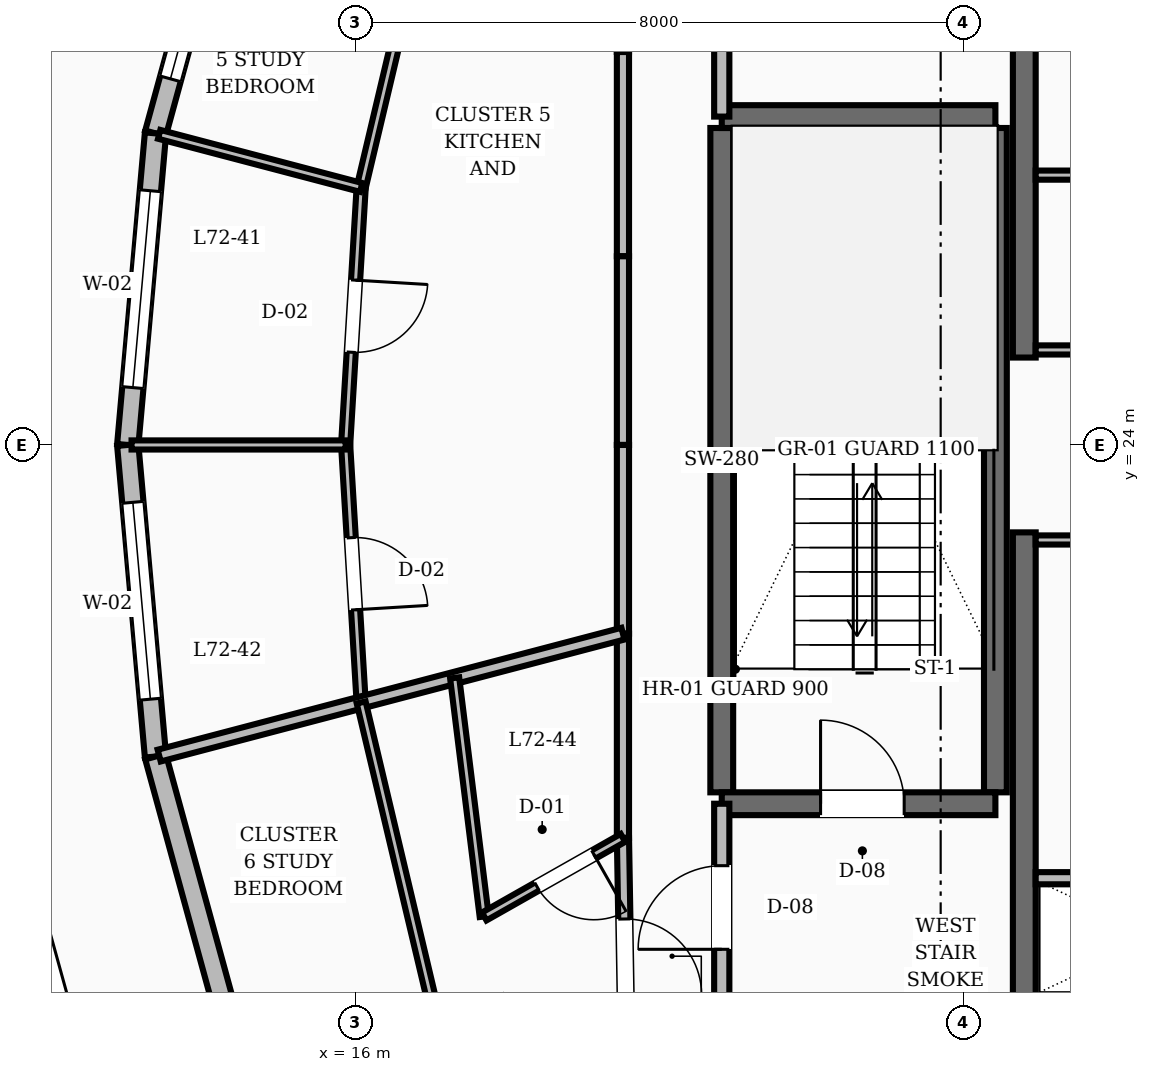
"""IFC4 building model, lengths in metres.
Left out: names, types, materials, properties, quantities, classifications, styles, units other than length and angle.
Written with IfcOpenShell. Run it as: python <this file> out.ifc"""

import sys

from ifc_helpers import new_model, si_unit, direction, frame, frame_2d, origin, place, context, subcontext, project, spatial, rectangle, extrude, element, fill, save


model = new_model("IFC4")
c1 = context("Model", 3, precision=1e-05, world=origin(), true_north=direction((0.0, 1.0)))
c2 = subcontext(c1, "Body", "Model", "MODEL_VIEW")
j1 = project(units=[si_unit("LENGTHUNIT", "METRE"), si_unit("PLANEANGLEUNIT", "RADIAN")], contexts=[c1])
p1 = place(None, origin())
s1 = spatial("IfcSite", under=j1, at=p1, CompositionType="ELEMENT")
p2 = place(p1, origin())
s2 = spatial("IfcBuilding", under=s1, at=p2, CompositionType="ELEMENT")
p3 = place(p2, frame((0.0, 0.0, 276.0)))
s3 = spatial("IfcBuildingStorey", under=s2, at=p3, CompositionType="ELEMENT", Elevation=276.0)
for number, where, z_axis, x_axis in (
    (1, (24.8, 16.55, 0.0), (0.0, 0.0, 1.0), (0.0, 1.0, 0.0)),
    (2, (24.8, 25.15, 0.0), (0.0, 0.0, 1.0), (0.0, 1.0, 0.0)),
):
    element("IfcWall", number, at=place(p3, frame(where, z_axis=z_axis, x_axis=x_axis)), inside=s3, PredefinedType="SHEAR", context=c2, shape_type="SweptSolid", body=[
        extrude(rectangle(XDim=6.3, YDim=0.3, at=frame_2d((3.15, 0.0))), origin(), (0.0, 0.0, 1.0), 3.6),
    ])
for number, where, z_axis, x_axis in (
    (3, (20.82, 19.43, 0.0), (0.0, 0.0, 1.0), (0.0, 1.0, 0.0)),
    (4, (24.42, 19.43, 0.0), (0.0, 0.0, 1.0), (0.0, 1.0, 0.0)),
):
    element("IfcWall", number, at=place(p3, frame(where, z_axis=z_axis, x_axis=x_axis)), inside=s3, PredefinedType="SHEAR", context=c2, shape_type="SweptSolid", body=[
        extrude(rectangle(XDim=8.74, YDim=0.3, at=frame_2d((4.37, 0.0))), origin(), (0.0, 0.0, 1.0), 3.6),
    ])
p4 = place(p3, frame((20.82, 19.28, 0.0), z_axis=(0.0, 0.0, 1.0), x_axis=(1.0, 0.0, 0.0)))
e5 = element("IfcWall", 5, at=p4, inside=s3, PredefinedType="SHEAR", context=c2, shape_type="SweptSolid", body=[
    extrude(rectangle(XDim=3.6, YDim=0.3, at=frame_2d((1.8, 0.0))), origin(), (0.0, 0.0, 1.0), 3.6),
])
p5 = place(p4, frame((1.3, 0.0, 0.0)))
e6 = element("IfcOpeningElement", 6, at=p5, cuts=e5, PredefinedType="OPENING", context=c2, shape_type="SweptSolid", body=[
    extrude(rectangle(XDim=1.1, YDim=2.1, at=frame_2d((0.55, 1.05))), frame((0.0, 0.16, 0.0), z_axis=(0.0, -1.0, 0.0), x_axis=(1.0, 0.0, 0.0)), (0.0, 0.0, 1.0), 0.32),
])
p6 = place(p3, frame((20.82, 28.32, 0.0), z_axis=(0.0, 0.0, 1.0), x_axis=(1.0, 0.0, 0.0)))
e7 = element("IfcWall", 7, at=p6, inside=s3, PredefinedType="SHEAR", context=c2, shape_type="SweptSolid", body=[
    extrude(rectangle(XDim=3.6, YDim=0.3, at=frame_2d((1.8, 0.0))), origin(), (0.0, 0.0, 1.0), 3.6),
])
p7 = place(p3, frame((14.451, 32.041, 0.0), z_axis=(0.0, 0.0, 1.0), x_axis=(-0.264426176781, -0.964405929592, 0.0)))
e8 = element("IfcWall", 8, at=p7, inside=s3, PredefinedType="STANDARD", context=c2, shape_type="SweptSolid", body=[
    extrude(rectangle(XDim=4.087, YDim=0.28, at=frame_2d((2.044, 0.0))), origin(), (0.0, 0.0, 1.0), 2.88),
])
p8 = place(p7, frame((0.744, 0.0, 0.8)))
e9 = element("IfcOpeningElement", 9, at=p8, cuts=e8, PredefinedType="OPENING", context=c2, shape_type="SweptSolid", body=[
    extrude(rectangle(XDim=2.6, YDim=1.65, at=frame_2d((1.3, 0.825))), frame((0.0, 0.15, 0.0), z_axis=(0.0, -1.0, 0.0), x_axis=(1.0, 0.0, 0.0)), (0.0, 0.0, 1.0), 0.3),
])
p9 = place(p3, frame((13.37, 28.099, 0.0), z_axis=(0.0, 0.0, 1.0), x_axis=(-0.08868496751, -0.996059725387, 0.0)))
e10 = element("IfcWall", 10, at=p9, inside=s3, PredefinedType="STANDARD", context=c2, shape_type="SweptSolid", body=[
    extrude(rectangle(XDim=4.115, YDim=0.28, at=frame_2d((2.058, 0.0))), origin(), (0.0, 0.0, 1.0), 2.88),
])
p10 = place(p9, frame((0.758, 0.0, 0.8)))
e11 = element("IfcOpeningElement", 11, at=p10, cuts=e10, PredefinedType="OPENING", context=c2, shape_type="SweptSolid", body=[
    extrude(rectangle(XDim=2.6, YDim=1.65, at=frame_2d((1.3, 0.825))), frame((0.0, 0.15, 0.0), z_axis=(0.0, -1.0, 0.0), x_axis=(1.0, 0.0, 0.0)), (0.0, 0.0, 1.0), 0.3),
])
p11 = place(p3, frame((13.005, 24.0, 0.0), z_axis=(0.0, 0.0, 1.0), x_axis=(0.08868496751, -0.996059725387, 0.0)))
e12 = element("IfcWall", 12, at=p11, inside=s3, PredefinedType="STANDARD", context=c2, shape_type="SweptSolid", body=[
    extrude(rectangle(XDim=4.115, YDim=0.28, at=frame_2d((2.058, 0.0))), origin(), (0.0, 0.0, 1.0), 2.88),
])
p12 = place(p11, frame((0.758, 0.0, 0.8)))
e13 = element("IfcOpeningElement", 13, at=p12, cuts=e12, PredefinedType="OPENING", context=c2, shape_type="SweptSolid", body=[
    extrude(rectangle(XDim=2.6, YDim=1.65, at=frame_2d((1.3, 0.825))), frame((0.0, 0.15, 0.0), z_axis=(0.0, -1.0, 0.0), x_axis=(1.0, 0.0, 0.0)), (0.0, 0.0, 1.0), 0.3),
])
p13 = place(p3, frame((13.37, 19.901, 0.0), z_axis=(0.0, 0.0, 1.0), x_axis=(0.264426176781, -0.964405929592, 0.0)))
e14 = element("IfcWall", 14, at=p13, inside=s3, PredefinedType="STANDARD", context=c2, shape_type="SweptSolid", body=[
    extrude(rectangle(XDim=4.087, YDim=0.28, at=frame_2d((2.044, 0.0))), origin(), (0.0, 0.0, 1.0), 2.88),
])
p14 = place(p3, frame((20.82, 16.55, 0.0), z_axis=(0.0, 0.0, 1.0), x_axis=(0.0, 1.0, 0.0)))
e15 = element("IfcWall", 15, at=p14, inside=s3, PredefinedType="SOLIDWALL", context=c2, shape_type="SweptSolid", body=[
    extrude(rectangle(XDim=2.73, YDim=0.2, at=frame_2d((1.365, 0.0))), origin(), (0.0, 0.0, 1.0), 2.87),
])
p15 = place(p14, frame((0.815, 0.0, 0.0)))
e16 = element("IfcOpeningElement", 16, at=p15, cuts=e15, PredefinedType="OPENING", context=c2, shape_type="SweptSolid", body=[
    extrude(rectangle(XDim=1.1, YDim=2.1, at=frame_2d((0.55, 1.05))), frame((0.0, 0.11, 0.0), z_axis=(0.0, -1.0, 0.0), x_axis=(1.0, 0.0, 0.0)), (0.0, 0.0, 1.0), 0.22),
])
p16 = place(p3, frame((20.82, 28.32, 0.0), z_axis=(0.0, 0.0, 1.0), x_axis=(0.0, 1.0, 0.0)))
e17 = element("IfcWall", 17, at=p16, inside=s3, PredefinedType="SOLIDWALL", context=c2, shape_type="SweptSolid", body=[
    extrude(rectangle(XDim=3.13, YDim=0.2, at=frame_2d((1.565, 0.0))), origin(), (0.0, 0.0, 1.0), 2.87),
])
p17 = place(p16, frame((1.09, 0.0, 0.0)))
e18 = element("IfcOpeningElement", 18, at=p17, cuts=e17, PredefinedType="OPENING", context=c2, shape_type="SweptSolid", body=[
    extrude(rectangle(XDim=0.95, YDim=2.1, at=frame_2d((0.475, 1.05))), frame((0.0, 0.11, 0.0), z_axis=(0.0, -1.0, 0.0), x_axis=(1.0, 0.0, 0.0)), (0.0, 0.0, 1.0), 0.22),
])
p18 = place(p3, frame((24.95, 18.3, 0.0), z_axis=(0.0, 0.0, 1.0), x_axis=(1.0, 0.0, 0.0)))
e19 = element("IfcWall", 19, at=p18, inside=s3, PredefinedType="SOLIDWALL", context=c2, shape_type="SweptSolid", body=[
    extrude(rectangle(XDim=3.2, YDim=0.16, at=frame_2d((1.6, 0.0))), origin(), (0.0, 0.0, 1.0), 2.87),
])
p19 = place(p3, frame((24.95, 25.25, 0.0), z_axis=(0.0, 0.0, 1.0), x_axis=(1.0, 0.0, 0.0)))
e20 = element("IfcWall", 20, at=p19, inside=s3, PredefinedType="PARTITIONING", context=c2, shape_type="SweptSolid", body=[
    extrude(rectangle(XDim=3.2, YDim=0.12, at=frame_2d((1.6, 0.0))), origin(), (0.0, 0.0, 1.0), 2.87),
])
p20 = place(p19, frame((1.125, 0.0, 0.0)))
e21 = element("IfcOpeningElement", 21, at=p20, cuts=e20, PredefinedType="OPENING", context=c2, shape_type="SweptSolid", body=[
    extrude(rectangle(XDim=0.95, YDim=2.1, at=frame_2d((0.475, 1.05))), frame((0.0, 0.07, 0.0), z_axis=(0.0, -1.0, 0.0), x_axis=(1.0, 0.0, 0.0)), (0.0, 0.0, 1.0), 0.14),
])
p21 = place(p3, frame((24.95, 22.75, 0.0), z_axis=(0.0, 0.0, 1.0), x_axis=(1.0, 0.0, 0.0)))
e22 = element("IfcWall", 22, at=p21, inside=s3, PredefinedType="PARTITIONING", context=c2, shape_type="SweptSolid", body=[
    extrude(rectangle(XDim=3.2, YDim=0.12, at=frame_2d((1.6, 0.0))), origin(), (0.0, 0.0, 1.0), 2.87),
])
p22 = place(p21, frame((1.125, 0.0, 0.0)))
e23 = element("IfcOpeningElement", 23, at=p22, cuts=e22, PredefinedType="OPENING", context=c2, shape_type="SweptSolid", body=[
    extrude(rectangle(XDim=0.95, YDim=2.1, at=frame_2d((0.475, 1.05))), frame((0.0, 0.07, 0.0), z_axis=(0.0, -1.0, 0.0), x_axis=(1.0, 0.0, 0.0)), (0.0, 0.0, 1.0), 0.14),
])
p23 = place(p3, frame((24.95, 27.55, 0.0), z_axis=(0.0, 0.0, 1.0), x_axis=(1.0, 0.0, 0.0)))
e24 = element("IfcWall", 24, at=p23, inside=s3, PredefinedType="PARTITIONING", context=c2, shape_type="SweptSolid", body=[
    extrude(rectangle(XDim=3.2, YDim=0.12, at=frame_2d((1.6, 0.0))), origin(), (0.0, 0.0, 1.0), 2.87),
])
p24 = place(p23, frame((1.125, 0.0, 0.0)))
e25 = element("IfcOpeningElement", 25, at=p24, cuts=e24, PredefinedType="OPENING", context=c2, shape_type="SweptSolid", body=[
    extrude(rectangle(XDim=0.95, YDim=2.1, at=frame_2d((0.475, 1.05))), frame((0.0, 0.07, 0.0), z_axis=(0.0, -1.0, 0.0), x_axis=(1.0, 0.0, 0.0)), (0.0, 0.0, 1.0), 0.14),
])
p25 = place(p3, frame((19.573, 32.303, 0.0), z_axis=(0.0, 0.0, 1.0), x_axis=(-0.016981035134, -0.999855811828, 0.0)))
e26 = element("IfcWall", 26, at=p25, inside=s3, PredefinedType="SOLIDWALL", context=c2, shape_type="SweptSolid", body=[
    extrude(rectangle(XDim=3.134, YDim=0.16, at=frame_2d((1.567, 0.0))), origin(), (0.0, 0.0, 1.0), 2.87),
])
p26 = place(p3, frame((19.52, 29.169, 0.0), z_axis=(0.0, 0.0, 1.0), x_axis=(0.0, -1.0, 0.0)))
e27 = element("IfcWall", 27, at=p26, inside=s3, PredefinedType="SOLIDWALL", context=c2, shape_type="SweptSolid", body=[
    extrude(rectangle(XDim=2.687, YDim=0.16, at=frame_2d((1.344, 0.0))), origin(), (0.0, 0.0, 1.0), 2.87),
])
for number, where, z_axis, x_axis in (
    (28, (19.52, 26.482, 0.0), (0.0, 0.0, 1.0), (0.0, -1.0, 0.0)),
    (29, (19.52, 24.0, 0.0), (0.0, 0.0, 1.0), (0.0, -1.0, 0.0)),
):
    element("IfcWall", number, at=place(p3, frame(where, z_axis=z_axis, x_axis=x_axis)), inside=s3, PredefinedType="SOLIDWALL", context=c2, shape_type="SweptSolid", body=[
        extrude(rectangle(XDim=2.482, YDim=0.16, at=frame_2d((1.241, 0.0))), origin(), (0.0, 0.0, 1.0), 2.87),
    ])
p27 = place(p3, frame((19.52, 21.518, 0.0), z_axis=(0.0, 0.0, 1.0), x_axis=(0.0, -1.0, 0.0)))
e30 = element("IfcWall", 30, at=p27, inside=s3, PredefinedType="SOLIDWALL", context=c2, shape_type="SweptSolid", body=[
    extrude(rectangle(XDim=2.687, YDim=0.16, at=frame_2d((1.344, 0.0))), origin(), (0.0, 0.0, 1.0), 2.87),
])
p28 = place(p3, frame((19.52, 18.831, 0.0), z_axis=(0.0, 0.0, 1.0), x_axis=(0.016981035134, -0.999855811828, 0.0)))
e31 = element("IfcWall", 31, at=p28, inside=s3, PredefinedType="SOLIDWALL", context=c2, shape_type="SweptSolid", body=[
    extrude(rectangle(XDim=3.134, YDim=0.16, at=frame_2d((1.567, 0.0))), origin(), (0.0, 0.0, 1.0), 2.87),
])
p29 = place(p28, frame((1.067, 0.0, 0.0)))
e32 = element("IfcOpeningElement", 32, at=p29, cuts=e31, PredefinedType="OPENING", context=c2, shape_type="SweptSolid", body=[
    extrude(rectangle(XDim=1.0, YDim=2.1, at=frame_2d((0.5, 1.05))), frame((0.0, 0.09, 0.0), z_axis=(0.0, -1.0, 0.0), x_axis=(1.0, 0.0, 0.0)), (0.0, 0.0, 1.0), 0.18),
])
p30 = place(p3, frame((17.688, 34.191, 0.0), z_axis=(0.0, 0.0, 1.0), x_axis=(-0.230512502036, -0.973069363615, 0.0)))
e33 = element("IfcWall", 33, at=p30, inside=s3, PredefinedType="PARTITIONING", context=c2, shape_type="SweptSolid", body=[
    extrude(rectangle(XDim=6.991, YDim=0.12, at=frame_2d((3.496, 0.0))), origin(), (0.0, 0.0, 1.0), 2.87),
])
p31 = place(p30, frame((3.021, 0.0, 0.0)))
e34 = element("IfcOpeningElement", 34, at=p31, cuts=e33, PredefinedType="OPENING", context=c2, shape_type="SweptSolid", body=[
    extrude(rectangle(XDim=0.95, YDim=2.1, at=frame_2d((0.475, 1.05))), frame((0.0, 0.07, 0.0), z_axis=(0.0, -1.0, 0.0), x_axis=(1.0, 0.0, 0.0)), (0.0, 0.0, 1.0), 0.14),
])
p32 = place(p3, frame((16.076, 27.388, 0.0), z_axis=(0.0, 0.0, 1.0), x_axis=(-0.060277885003, -0.998181635064, 0.0)))
e35 = element("IfcWall", 35, at=p32, inside=s3, PredefinedType="PARTITIONING", context=c2, shape_type="SweptSolid", body=[
    extrude(rectangle(XDim=3.394, YDim=0.12, at=frame_2d((1.697, 0.0))), origin(), (0.0, 0.0, 1.0), 2.87),
])
p33 = place(p32, frame((1.222, 0.0, 0.0)))
e36 = element("IfcOpeningElement", 36, at=p33, cuts=e35, PredefinedType="OPENING", context=c2, shape_type="SweptSolid", body=[
    extrude(rectangle(XDim=0.95, YDim=2.1, at=frame_2d((0.475, 1.05))), frame((0.0, 0.07, 0.0), z_axis=(0.0, -1.0, 0.0), x_axis=(1.0, 0.0, 0.0)), (0.0, 0.0, 1.0), 0.14),
])
p34 = place(p3, frame((16.076, 27.388, 0.0), z_axis=(0.0, 0.0, 1.0), x_axis=(-0.96713435231, 0.25426589347, 0.0)))
e37 = element("IfcWall", 37, at=p34, inside=s3, PredefinedType="PARTITIONING", context=c2, shape_type="SweptSolid", body=[
    extrude(rectangle(XDim=2.748, YDim=0.12, at=frame_2d((1.374, 0.0))), origin(), (0.0, 0.0, 1.0), 2.87),
])
p35 = place(p3, frame((15.872, 24.0, 0.0), z_axis=(0.0, 0.0, 1.0), x_axis=(0.060277885003, -0.998181635064, 0.0)))
e38 = element("IfcWall", 38, at=p35, inside=s3, PredefinedType="PARTITIONING", context=c2, shape_type="SweptSolid", body=[
    extrude(rectangle(XDim=3.394, YDim=0.12, at=frame_2d((1.697, 0.0))), origin(), (0.0, 0.0, 1.0), 2.87),
])
p36 = place(p35, frame((1.222, 0.0, 0.0)))
e39 = element("IfcOpeningElement", 39, at=p36, cuts=e38, PredefinedType="OPENING", context=c2, shape_type="SweptSolid", body=[
    extrude(rectangle(XDim=0.95, YDim=2.1, at=frame_2d((0.475, 1.05))), frame((0.0, 0.07, 0.0), z_axis=(0.0, -1.0, 0.0), x_axis=(1.0, 0.0, 0.0)), (0.0, 0.0, 1.0), 0.14),
])
p37 = place(p3, frame((15.872, 24.0, 0.0), z_axis=(0.0, 0.0, 1.0), x_axis=(-1.0, 0.0, 0.0)))
e40 = element("IfcWall", 40, at=p37, inside=s3, PredefinedType="PARTITIONING", context=c2, shape_type="SweptSolid", body=[
    extrude(rectangle(XDim=2.816, YDim=0.12, at=frame_2d((1.408, 0.0))), origin(), (0.0, 0.0, 1.0), 2.87),
])
p38 = place(p3, frame((19.52, 21.518, 0.0), z_axis=(0.0, 0.0, 1.0), x_axis=(-0.967130154466, -0.254281859995, 0.0)))
e41 = element("IfcWall", 41, at=p38, inside=s3, PredefinedType="SOLIDWALL", context=c2, shape_type="SweptSolid", body=[
    extrude(rectangle(XDim=6.309, YDim=0.16, at=frame_2d((3.154, 0.0))), origin(), (0.0, 0.0, 1.0), 2.87),
])
p39 = place(p3, frame((17.306, 20.936, 0.0), z_axis=(0.0, 0.0, 1.0), x_axis=(0.12312261881, -0.99239146547, 0.0)))
e42 = element("IfcWall", 42, at=p39, inside=s3, PredefinedType="PARTITIONING", context=c2, shape_type="SweptSolid", body=[
    extrude(rectangle(XDim=3.163, YDim=0.12, at=frame_2d((1.582, 0.0))), origin(), (0.0, 0.0, 1.0), 2.87),
])
p40 = place(p3, frame((19.52, 18.831, 0.0), z_axis=(0.0, 0.0, 1.0), x_axis=(-0.870085428534, -0.49290095055, 0.0)))
e43 = element("IfcWall", 43, at=p40, inside=s3, PredefinedType="PARTITIONING", context=c2, shape_type="SweptSolid", body=[
    extrude(rectangle(XDim=2.097, YDim=0.12, at=frame_2d((1.049, 0.0))), origin(), (0.0, 0.0, 1.0), 2.87),
])
p41 = place(p40, frame((0.44, 0.0, 0.0)))
e44 = element("IfcOpeningElement", 44, at=p41, cuts=e43, PredefinedType="OPENING", context=c2, shape_type="SweptSolid", body=[
    extrude(rectangle(XDim=0.86, YDim=2.1, at=frame_2d((0.43, 1.05))), frame((0.0, 0.07, 0.0), z_axis=(0.0, -1.0, 0.0), x_axis=(1.0, 0.0, 0.0)), (0.0, 0.0, 1.0), 0.14),
])
p42 = place(p3, frame((16.076, 20.612, 0.0), z_axis=(0.0, 0.0, 1.0), x_axis=(0.230512502036, -0.973069363615, 0.0)))
e45 = element("IfcWall", 45, at=p42, inside=s3, PredefinedType="PARTITIONING", context=c2, shape_type="SweptSolid", body=[
    extrude(rectangle(XDim=6.991, YDim=0.12, at=frame_2d((3.496, 0.0))), origin(), (0.0, 0.0, 1.0), 2.87),
])
p43 = place(p42, frame((4.156, 0.0, 0.0)))
e46 = element("IfcOpeningElement", 46, at=p43, cuts=e45, PredefinedType="OPENING", context=c2, shape_type="SweptSolid", body=[
    extrude(rectangle(XDim=0.95, YDim=2.1, at=frame_2d((0.475, 1.05))), frame((0.0, 0.07, 0.0), z_axis=(0.0, -1.0, 0.0), x_axis=(1.0, 0.0, 0.0)), (0.0, 0.0, 1.0), 0.14),
])
p44 = place(p8, origin())
e47 = element("IfcWindow", 47, at=p44, inside=s3, PartitioningType="SINGLE_PANEL", PredefinedType="WINDOW", context=c2, shape_type="SweptSolid", body=[
    extrude(rectangle(XDim=2.6, YDim=1.65, at=frame_2d((1.3, 0.825))), frame((0.0, 0.03, 0.0), z_axis=(0.0, -1.0, 0.0), x_axis=(1.0, 0.0, 0.0)), (0.0, 0.0, 1.0), 0.06),
])
fill(e9, e47)
p45 = place(p10, origin())
e48 = element("IfcWindow", 48, at=p45, inside=s3, PartitioningType="SINGLE_PANEL", PredefinedType="WINDOW", context=c2, shape_type="SweptSolid", body=[
    extrude(rectangle(XDim=2.6, YDim=1.65, at=frame_2d((1.3, 0.825))), frame((0.0, 0.03, 0.0), z_axis=(0.0, -1.0, 0.0), x_axis=(1.0, 0.0, 0.0)), (0.0, 0.0, 1.0), 0.06),
])
fill(e11, e48)
p46 = place(p12, origin())
e49 = element("IfcWindow", 49, at=p46, inside=s3, PartitioningType="SINGLE_PANEL", PredefinedType="WINDOW", context=c2, shape_type="SweptSolid", body=[
    extrude(rectangle(XDim=2.6, YDim=1.65, at=frame_2d((1.3, 0.825))), frame((0.0, 0.03, 0.0), z_axis=(0.0, -1.0, 0.0), x_axis=(1.0, 0.0, 0.0)), (0.0, 0.0, 1.0), 0.06),
])
fill(e13, e49)
p47 = place(p5, origin())
e50 = element("IfcDoor", 50, at=p47, inside=s3, OperationType="SINGLE_SWING_LEFT", PredefinedType="DOOR", context=c2, shape_type="SweptSolid", body=[
    extrude(rectangle(XDim=1.1, YDim=2.1, at=frame_2d((0.55, 1.05))), frame((0.0, 0.025, 0.0), z_axis=(0.0, -1.0, 0.0), x_axis=(1.0, 0.0, 0.0)), (0.0, 0.0, 1.0), 0.05),
])
fill(e6, e50)
p48 = place(p15, origin())
e51 = element("IfcDoor", 51, at=p48, inside=s3, OperationType="SINGLE_SWING_LEFT", PredefinedType="DOOR", context=c2, shape_type="SweptSolid", body=[
    extrude(rectangle(XDim=1.1, YDim=2.1, at=frame_2d((0.55, 1.05))), frame((0.0, 0.025, 0.0), z_axis=(0.0, -1.0, 0.0), x_axis=(1.0, 0.0, 0.0)), (0.0, 0.0, 1.0), 0.05),
])
fill(e16, e51)
p49 = place(p33, origin())
e52 = element("IfcDoor", 52, at=p49, inside=s3, OperationType="SINGLE_SWING_LEFT", PredefinedType="DOOR", context=c2, shape_type="SweptSolid", body=[
    extrude(rectangle(XDim=0.95, YDim=2.1, at=frame_2d((0.475, 1.05))), frame((0.0, 0.025, 0.0), z_axis=(0.0, -1.0, 0.0), x_axis=(1.0, 0.0, 0.0)), (0.0, 0.0, 1.0), 0.05),
])
fill(e36, e52)
p50 = place(p36, origin())
e53 = element("IfcDoor", 53, at=p50, inside=s3, OperationType="SINGLE_SWING_RIGHT", PredefinedType="DOOR", context=c2, shape_type="SweptSolid", body=[
    extrude(rectangle(XDim=0.95, YDim=2.1, at=frame_2d((0.475, 1.05))), frame((0.0, 0.025, 0.0), z_axis=(0.0, -1.0, 0.0), x_axis=(1.0, 0.0, 0.0)), (0.0, 0.0, 1.0), 0.05),
])
fill(e39, e53)
p51 = place(p41, origin())
e54 = element("IfcDoor", 54, at=p51, inside=s3, OperationType="SINGLE_SWING_LEFT", PredefinedType="DOOR", context=c2, shape_type="SweptSolid", body=[
    extrude(rectangle(XDim=0.86, YDim=2.1, at=frame_2d((0.43, 1.05))), frame((0.0, 0.025, 0.0), z_axis=(0.0, -1.0, 0.0), x_axis=(1.0, 0.0, 0.0)), (0.0, 0.0, 1.0), 0.05),
])
fill(e44, e54)
p52 = place(p29, origin())
e55 = element("IfcDoor", 55, at=p52, inside=s3, OperationType="SINGLE_SWING_RIGHT", PredefinedType="DOOR", context=c2, shape_type="SweptSolid", body=[
    extrude(rectangle(XDim=1.0, YDim=2.1, at=frame_2d((0.5, 1.05))), frame((0.0, 0.025, 0.0), z_axis=(0.0, -1.0, 0.0), x_axis=(1.0, 0.0, 0.0)), (0.0, 0.0, 1.0), 0.05),
])
fill(e32, e55)
save(model, sys.argv[1])
